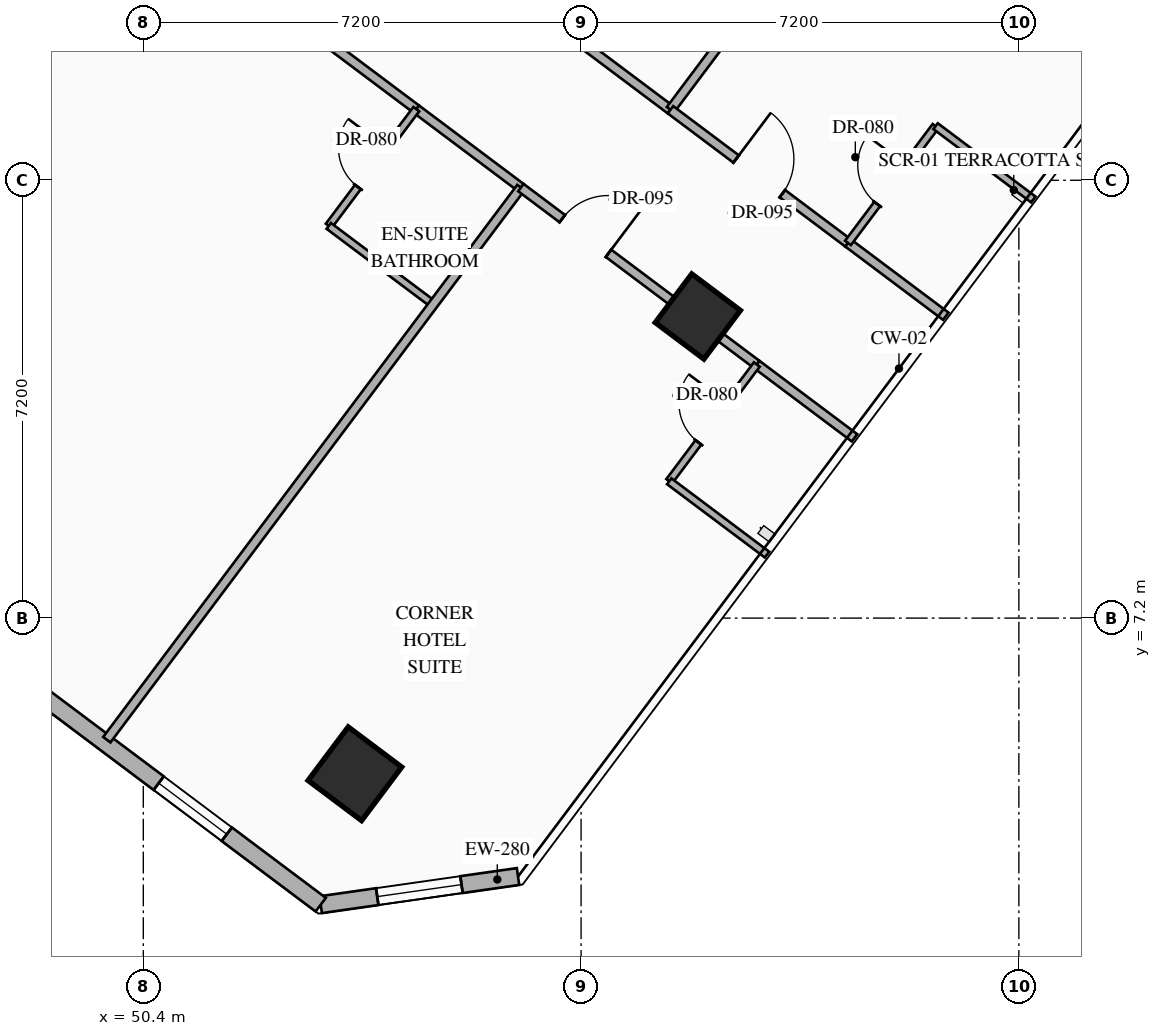
"""IFC4 building model, lengths in metres.
Left out: names, types, materials, properties, quantities, classifications, styles, units other than length and angle.
Written with IfcOpenShell. Run it as: python <this file> out.ifc"""

import sys

from ifc_helpers import new_model, si_unit, direction, frame, frame_2d, origin, origin_2d, place, context, subcontext, project, spatial, rectangle, hollow_rectangle, extrude, element, fill, save


model = new_model("IFC4")
c1 = context("Model", 3, precision=1e-05, world=origin(), true_north=direction((0.0, 1.0)))
c2 = subcontext(c1, "Body", "Model", "MODEL_VIEW")
j1 = project(units=[si_unit("LENGTHUNIT", "METRE"), si_unit("PLANEANGLEUNIT", "RADIAN")], contexts=[c1])
p1 = place(None, origin())
s1 = spatial("IfcSite", under=j1, at=p1, CompositionType="ELEMENT")
p2 = place(p1, origin())
s2 = spatial("IfcBuilding", under=s1, at=p2, CompositionType="ELEMENT")
p3 = place(p2, frame((0.0, 0.0, 60.05)))
s3 = spatial("IfcBuildingStorey", under=s2, at=p3, CompositionType="ELEMENT", Elevation=60.05)
p4 = place(p3, frame((53.88, 4.64, 0.0), z_axis=(0.0, 0.0, 1.0), x_axis=(0.799999996291, -0.600000004945, 0.0)))
e1 = element("IfcColumn", 1, at=p4, inside=s3, PredefinedType="COLUMN", context=c2, shape_type="SweptSolid", body=[
    extrude(hollow_rectangle(XDim=1.1, YDim=1.1, WallThickness=0.04, at=origin_2d()), origin(), (0.0, 0.0, 1.0), 3.35),
])
p5 = place(p3, frame((59.52, 12.16, 0.0), z_axis=(0.0, 0.0, 1.0), x_axis=(0.799999996291, -0.600000004945, 0.0)))
e2 = element("IfcColumn", 2, at=p5, inside=s3, PredefinedType="COLUMN", context=c2, shape_type="SweptSolid", body=[
    extrude(hollow_rectangle(XDim=1.0, YDim=1.0, WallThickness=0.038, at=origin_2d()), origin(), (0.0, 0.0, 1.0), 3.35),
])
p6 = place(p3, frame((56.563, 2.95, 0.0), z_axis=(0.0, 0.0, 1.0), x_axis=(-0.989977778067, -0.141223223777, 0.0)))
e3 = element("IfcWall", 3, at=p6, inside=s3, PredefinedType="STANDARD", context=c2, shape_type="SweptSolid", body=[
    extrude(rectangle(XDim=3.278, YDim=0.28, at=frame_2d((1.639, 0.0))), origin(), (0.0, 0.0, 1.0), 3.13),
])
p7 = place(p6, frame((0.939, 0.0, 0.85)))
e4 = element("IfcOpeningElement", 4, at=p7, cuts=e3, PredefinedType="OPENING", context=c2, shape_type="SweptSolid", body=[
    extrude(rectangle(XDim=1.4, YDim=1.8, at=frame_2d((0.7, 0.9))), frame((0.0, 0.15, 0.0), z_axis=(0.0, -1.0, 0.0), x_axis=(1.0, 0.0, 0.0)), (0.0, 0.0, 1.0), 0.3),
])
p8 = place(p3, frame((53.318, 2.487, 0.0), z_axis=(0.0, 0.0, 1.0), x_axis=(-0.800004174678, 0.599994433723, 0.0)))
e5 = element("IfcWall", 5, at=p8, inside=s3, PredefinedType="STANDARD", context=c2, shape_type="SweptSolid", body=[
    extrude(rectangle(XDim=35.089, YDim=0.28, at=frame_2d((17.544, 0.0))), origin(), (0.0, 0.0, 1.0), 3.13),
])
p9 = place(p8, frame((1.931, 0.0, 0.85)))
e6 = element("IfcOpeningElement", 6, at=p9, cuts=e5, PredefinedType="OPENING", context=c2, shape_type="SweptSolid", body=[
    extrude(rectangle(XDim=1.4, YDim=1.8, at=frame_2d((0.7, 0.9))), frame((0.0, 0.15, 0.0), z_axis=(0.0, -1.0, 0.0), x_axis=(1.0, 0.0, 0.0)), (0.0, 0.0, 1.0), 0.3),
])
p10 = place(p8, frame((6.819, 0.0, 0.85)))
e7 = element("IfcOpeningElement", 7, at=p10, cuts=e5, PredefinedType="OPENING", context=c2, shape_type="SweptSolid", body=[
    extrude(rectangle(XDim=1.4, YDim=1.8, at=frame_2d((0.7, 0.9))), frame((0.0, 0.15, 0.0), z_axis=(0.0, -1.0, 0.0), x_axis=(1.0, 0.0, 0.0)), (0.0, 0.0, 1.0), 0.3),
])
p11 = place(p8, frame((11.832, 0.0, 0.85)))
e8 = element("IfcOpeningElement", 8, at=p11, cuts=e5, PredefinedType="OPENING", context=c2, shape_type="SweptSolid", body=[
    extrude(rectangle(XDim=1.4, YDim=1.8, at=frame_2d((0.7, 0.9))), frame((0.0, 0.15, 0.0), z_axis=(0.0, -1.0, 0.0), x_axis=(1.0, 0.0, 0.0)), (0.0, 0.0, 1.0), 0.3),
])
p12 = place(p8, frame((17.647, 0.0, 0.85)))
e9 = element("IfcOpeningElement", 9, at=p12, cuts=e5, PredefinedType="OPENING", context=c2, shape_type="SweptSolid", body=[
    extrude(rectangle(XDim=1.4, YDim=1.8, at=frame_2d((0.7, 0.9))), frame((0.0, 0.15, 0.0), z_axis=(0.0, -1.0, 0.0), x_axis=(1.0, 0.0, 0.0)), (0.0, 0.0, 1.0), 0.3),
])
p13 = place(p8, frame((21.857, 0.0, 0.85)))
e10 = element("IfcOpeningElement", 10, at=p13, cuts=e5, PredefinedType="OPENING", context=c2, shape_type="SweptSolid", body=[
    extrude(rectangle(XDim=1.4, YDim=1.8, at=frame_2d((0.7, 0.9))), frame((0.0, 0.15, 0.0), z_axis=(0.0, -1.0, 0.0), x_axis=(1.0, 0.0, 0.0)), (0.0, 0.0, 1.0), 0.3),
])
p14 = place(p8, frame((26.87, 0.0, 0.85)))
e11 = element("IfcOpeningElement", 11, at=p14, cuts=e5, PredefinedType="OPENING", context=c2, shape_type="SweptSolid", body=[
    extrude(rectangle(XDim=1.4, YDim=1.8, at=frame_2d((0.7, 0.9))), frame((0.0, 0.15, 0.0), z_axis=(0.0, -1.0, 0.0), x_axis=(1.0, 0.0, 0.0)), (0.0, 0.0, 1.0), 0.3),
])
p15 = place(p8, frame((31.757, 0.0, 0.85)))
e12 = element("IfcOpeningElement", 12, at=p15, cuts=e5, PredefinedType="OPENING", context=c2, shape_type="SweptSolid", body=[
    extrude(rectangle(XDim=1.4, YDim=1.8, at=frame_2d((0.7, 0.9))), frame((0.0, 0.15, 0.0), z_axis=(0.0, -1.0, 0.0), x_axis=(1.0, 0.0, 0.0)), (0.0, 0.0, 1.0), 0.3),
])
p16 = place(p3, frame((57.35, 16.85, 0.0), z_axis=(0.0, 0.0, 1.0), x_axis=(0.79998637334, -0.60001816845, 0.0)))
e13 = element("IfcWall", 13, at=p16, inside=s3, PredefinedType="PARTITIONING", context=c2, shape_type="SweptSolid", body=[
    extrude(rectangle(XDim=2.15, YDim=0.15, at=frame_2d((1.075, 0.0))), origin(), (0.0, 0.0, 1.0), 2.775),
])
p17 = place(p3, frame((59.07, 15.56, 0.0), z_axis=(0.0, 0.0, 1.0), x_axis=(0.599996617946, 0.80000253653, 0.0)))
e14 = element("IfcWall", 14, at=p17, inside=s3, PredefinedType="PARTITIONING", context=c2, shape_type="SweptSolid", body=[
    extrude(rectangle(XDim=11.55, YDim=0.15, at=frame_2d((5.775, 0.0))), origin(), (0.0, 0.0, 1.0), 3.13),
])
p18 = place(p3, frame((59.07, 15.56, 0.0), z_axis=(0.0, 0.0, 1.0), x_axis=(0.8, -0.6, 0.0)))
e15 = element("IfcWall", 15, at=p18, inside=s3, PredefinedType="PARTITIONING", context=c2, shape_type="SweptSolid", body=[
    extrude(rectangle(XDim=3.65, YDim=0.15, at=frame_2d((1.825, 0.0))), origin(), (0.0, 0.0, 1.0), 2.775),
])
p19 = place(p18, frame((1.35, 0.0, 0.0)))
e16 = element("IfcOpeningElement", 16, at=p19, cuts=e15, PredefinedType="OPENING", context=c2, shape_type="SweptSolid", body=[
    extrude(rectangle(XDim=0.95, YDim=2.15, at=frame_2d((0.475, 1.075))), frame((0.0, 0.085, 0.0), z_axis=(0.0, -1.0, 0.0), x_axis=(1.0, 0.0, 0.0)), (0.0, 0.0, 1.0), 0.17),
])
p20 = place(p3, frame((61.99, 13.37, 0.0), z_axis=(0.0, 0.0, 1.0), x_axis=(0.79997084737, -0.600038868206, 0.0)))
e17 = element("IfcWall", 17, at=p20, inside=s3, PredefinedType="PARTITIONING", context=c2, shape_type="SweptSolid", body=[
    extrude(rectangle(XDim=2.01, YDim=0.15, at=frame_2d((1.005, 0.0))), origin(), (0.0, 0.0, 1.0), 3.13),
])
p21 = place(p3, frame((61.99, 13.37, 0.0), z_axis=(0.0, 0.0, 1.0), x_axis=(0.6, 0.8, 0.0)))
e18 = element("IfcWall", 18, at=p21, inside=s3, PredefinedType="PARTITIONING", context=c2, shape_type="SweptSolid", body=[
    extrude(rectangle(XDim=2.4, YDim=0.12, at=frame_2d((1.2, 0.0))), origin(), (0.0, 0.0, 1.0), 3.13),
])
p22 = place(p21, frame((0.8, 0.0, 0.0)))
e19 = element("IfcOpeningElement", 19, at=p22, cuts=e18, PredefinedType="OPENING", context=c2, shape_type="SweptSolid", body=[
    extrude(rectangle(XDim=0.8, YDim=2.06, at=frame_2d((0.4, 1.03))), frame((0.0, 0.07, 0.0), z_axis=(0.0, -1.0, 0.0), x_axis=(1.0, 0.0, 0.0)), (0.0, 0.0, 1.0), 0.14),
])
p23 = place(p3, frame((63.43, 15.29, 0.0), z_axis=(0.0, 0.0, 1.0), x_axis=(0.800014574191, -0.599980567254, 0.0)))
e20 = element("IfcWall", 20, at=p23, inside=s3, PredefinedType="PARTITIONING", context=c2, shape_type="SweptSolid", body=[
    extrude(rectangle(XDim=2.01, YDim=0.12, at=frame_2d((1.005, 0.0))), origin(), (0.0, 0.0, 1.0), 3.13),
])
p24 = place(p3, frame((46.37, 21.96, 0.0), z_axis=(0.0, 0.0, 1.0), x_axis=(0.799997249048, -0.600003667918, 0.0)))
e21 = element("IfcWall", 21, at=p24, inside=s3, PredefinedType="PARTITIONING", context=c2, shape_type="SweptSolid", body=[
    extrude(rectangle(XDim=10.65, YDim=0.15, at=frame_2d((5.325, 0.0))), origin(), (0.0, 0.0, 1.0), 2.425),
])
p25 = place(p24, frame((3.062, 0.0, 0.0)))
e22 = element("IfcOpeningElement", 22, at=p25, cuts=e21, PredefinedType="OPENING", context=c2, shape_type="SweptSolid", body=[
    extrude(rectangle(XDim=0.95, YDim=2.15, at=frame_2d((0.475, 1.075))), frame((0.0, 0.085, 0.0), z_axis=(0.0, -1.0, 0.0), x_axis=(1.0, 0.0, 0.0)), (0.0, 0.0, 1.0), 0.17),
])
p26 = place(p3, frame((54.89, 15.57, 0.0), z_axis=(0.0, 0.0, 1.0), x_axis=(0.800027249606, -0.599963665473, 0.0)))
e23 = element("IfcWall", 23, at=p26, inside=s3, PredefinedType="PARTITIONING", context=c2, shape_type="SweptSolid", body=[
    extrude(rectangle(XDim=2.15, YDim=0.15, at=frame_2d((1.075, 0.0))), origin(), (0.0, 0.0, 1.0), 2.425),
])
p27 = place(p3, frame((53.45, 13.65, 0.0), z_axis=(0.0, 0.0, 1.0), x_axis=(0.599951172744, 0.800036618114, 0.0)))
e24 = element("IfcWall", 24, at=p27, inside=s3, PredefinedType="PARTITIONING", context=c2, shape_type="SweptSolid", body=[
    extrude(rectangle(XDim=2.4, YDim=0.12, at=frame_2d((1.2, 0.0))), origin(), (0.0, 0.0, 1.0), 3.13),
])
p28 = place(p27, frame((0.8, 0.0, 0.0)))
e25 = element("IfcOpeningElement", 25, at=p28, cuts=e24, PredefinedType="OPENING", context=c2, shape_type="SweptSolid", body=[
    extrude(rectangle(XDim=0.8, YDim=2.06, at=frame_2d((0.4, 1.03))), frame((0.0, 0.07, 0.0), z_axis=(0.0, -1.0, 0.0), x_axis=(1.0, 0.0, 0.0)), (0.0, 0.0, 1.0), 0.14),
])
p29 = place(p3, frame((53.45, 13.65, 0.0), z_axis=(0.0, 0.0, 1.0), x_axis=(0.800040880289, -0.59994548908, 0.0)))
e26 = element("IfcWall", 26, at=p29, inside=s3, PredefinedType="PARTITIONING", context=c2, shape_type="SweptSolid", body=[
    extrude(rectangle(XDim=2.15, YDim=0.12, at=frame_2d((1.075, 0.0))), origin(), (0.0, 0.0, 1.0), 3.13),
])
p30 = place(p3, frame((49.8, 5.2, 0.0), z_axis=(0.0, 0.0, 1.0), x_axis=(0.6, 0.8, 0.0)))
e27 = element("IfcWall", 27, at=p30, inside=s3, PredefinedType="PARTITIONING", context=c2, shape_type="SweptSolid", body=[
    extrude(rectangle(XDim=11.35, YDim=0.15, at=frame_2d((5.675, 0.0))), origin(), (0.0, 0.0, 1.0), 3.13),
])
p31 = place(p3, frame((56.61, 14.28, 0.0), z_axis=(0.0, 0.0, 1.0), x_axis=(0.8, -0.6, 0.0)))
e28 = element("IfcWall", 28, at=p31, inside=s3, PredefinedType="PARTITIONING", context=c2, shape_type="SweptSolid", body=[
    extrude(rectangle(XDim=4.85, YDim=0.15, at=frame_2d((2.425, 0.0))), origin(), (0.0, 0.0, 1.0), 2.425),
])
p32 = place(p31, frame((0.851, 0.0, 0.0)))
e29 = element("IfcOpeningElement", 29, at=p32, cuts=e28, PredefinedType="OPENING", context=c2, shape_type="SweptSolid", body=[
    extrude(rectangle(XDim=0.95, YDim=2.15, at=frame_2d((0.475, 1.075))), frame((0.0, 0.085, 0.0), z_axis=(0.0, -1.0, 0.0), x_axis=(1.0, 0.0, 0.0)), (0.0, 0.0, 1.0), 0.17),
])
p33 = place(p3, frame((60.49, 11.37, 0.0), z_axis=(0.0, 0.0, 1.0), x_axis=(0.79997084737, -0.600038868206, 0.0)))
e30 = element("IfcWall", 30, at=p33, inside=s3, PredefinedType="PARTITIONING", context=c2, shape_type="SweptSolid", body=[
    extrude(rectangle(XDim=2.01, YDim=0.15, at=frame_2d((1.005, 0.0))), origin(), (0.0, 0.0, 1.0), 3.13),
])
p34 = place(p3, frame((59.05, 9.45, 0.0), z_axis=(0.0, 0.0, 1.0), x_axis=(0.599951172744, 0.800036618114, 0.0)))
e31 = element("IfcWall", 31, at=p34, inside=s3, PredefinedType="PARTITIONING", context=c2, shape_type="SweptSolid", body=[
    extrude(rectangle(XDim=2.4, YDim=0.12, at=frame_2d((1.2, 0.0))), origin(), (0.0, 0.0, 1.0), 3.13),
])
p35 = place(p34, frame((0.8, 0.0, 0.0)))
e32 = element("IfcOpeningElement", 32, at=p35, cuts=e31, PredefinedType="OPENING", context=c2, shape_type="SweptSolid", body=[
    extrude(rectangle(XDim=0.8, YDim=2.06, at=frame_2d((0.4, 1.03))), frame((0.0, 0.07, 0.0), z_axis=(0.0, -1.0, 0.0), x_axis=(1.0, 0.0, 0.0)), (0.0, 0.0, 1.0), 0.14),
])
p36 = place(p3, frame((59.05, 9.45, 0.0), z_axis=(0.0, 0.0, 1.0), x_axis=(0.79997084737, -0.600038868206, 0.0)))
e33 = element("IfcWall", 33, at=p36, inside=s3, PredefinedType="PARTITIONING", context=c2, shape_type="SweptSolid", body=[
    extrude(rectangle(XDim=2.01, YDim=0.12, at=frame_2d((1.005, 0.0))), origin(), (0.0, 0.0, 1.0), 3.13),
])
p37 = place(p7, origin())
e34 = element("IfcWindow", 34, at=p37, inside=s3, PartitioningType="SINGLE_PANEL", PredefinedType="WINDOW", context=c2, shape_type="SweptSolid", body=[
    extrude(rectangle(XDim=1.4, YDim=1.8, at=frame_2d((0.7, 0.9))), frame((0.0, 0.03, 0.0), z_axis=(0.0, -1.0, 0.0), x_axis=(1.0, 0.0, 0.0)), (0.0, 0.0, 1.0), 0.06),
])
fill(e4, e34)
p38 = place(p9, origin())
e35 = element("IfcWindow", 35, at=p38, inside=s3, PartitioningType="SINGLE_PANEL", PredefinedType="WINDOW", context=c2, shape_type="SweptSolid", body=[
    extrude(rectangle(XDim=1.4, YDim=1.8, at=frame_2d((0.7, 0.9))), frame((0.0, 0.03, 0.0), z_axis=(0.0, -1.0, 0.0), x_axis=(1.0, 0.0, 0.0)), (0.0, 0.0, 1.0), 0.06),
])
fill(e6, e35)
p39 = place(p19, origin())
e36 = element("IfcDoor", 36, at=p39, inside=s3, OperationType="SINGLE_SWING_LEFT", PredefinedType="DOOR", context=c2, shape_type="SweptSolid", body=[
    extrude(rectangle(XDim=0.95, YDim=2.15, at=frame_2d((0.475, 1.075))), frame((0.0, 0.025, 0.0), z_axis=(0.0, -1.0, 0.0), x_axis=(1.0, 0.0, 0.0)), (0.0, 0.0, 1.0), 0.05),
])
fill(e16, e36)
p40 = place(p22, origin())
e37 = element("IfcDoor", 37, at=p40, inside=s3, OperationType="SINGLE_SWING_RIGHT", PredefinedType="DOOR", context=c2, shape_type="SweptSolid", body=[
    extrude(rectangle(XDim=0.8, YDim=2.06, at=frame_2d((0.4, 1.03))), frame((0.0, 0.025, 0.0), z_axis=(0.0, -1.0, 0.0), x_axis=(1.0, 0.0, 0.0)), (0.0, 0.0, 1.0), 0.05),
])
fill(e19, e37)
p41 = place(p28, origin())
e38 = element("IfcDoor", 38, at=p41, inside=s3, OperationType="SINGLE_SWING_RIGHT", PredefinedType="DOOR", context=c2, shape_type="SweptSolid", body=[
    extrude(rectangle(XDim=0.8, YDim=2.06, at=frame_2d((0.4, 1.03))), frame((0.0, 0.025, 0.0), z_axis=(0.0, -1.0, 0.0), x_axis=(1.0, 0.0, 0.0)), (0.0, 0.0, 1.0), 0.05),
])
fill(e25, e38)
p42 = place(p32, origin())
e39 = element("IfcDoor", 39, at=p42, inside=s3, OperationType="SINGLE_SWING_RIGHT", PredefinedType="DOOR", context=c2, shape_type="SweptSolid", body=[
    extrude(rectangle(XDim=0.95, YDim=2.15, at=frame_2d((0.475, 1.075))), frame((0.0, 0.025, 0.0), z_axis=(0.0, -1.0, 0.0), x_axis=(1.0, 0.0, 0.0)), (0.0, 0.0, 1.0), 0.05),
])
fill(e29, e39)
p43 = place(p35, origin())
e40 = element("IfcDoor", 40, at=p43, inside=s3, OperationType="SINGLE_SWING_RIGHT", PredefinedType="DOOR", context=c2, shape_type="SweptSolid", body=[
    extrude(rectangle(XDim=0.8, YDim=2.06, at=frame_2d((0.4, 1.03))), frame((0.0, 0.025, 0.0), z_axis=(0.0, -1.0, 0.0), x_axis=(1.0, 0.0, 0.0)), (0.0, 0.0, 1.0), 0.05),
])
fill(e32, e40)
save(model, sys.argv[1])
